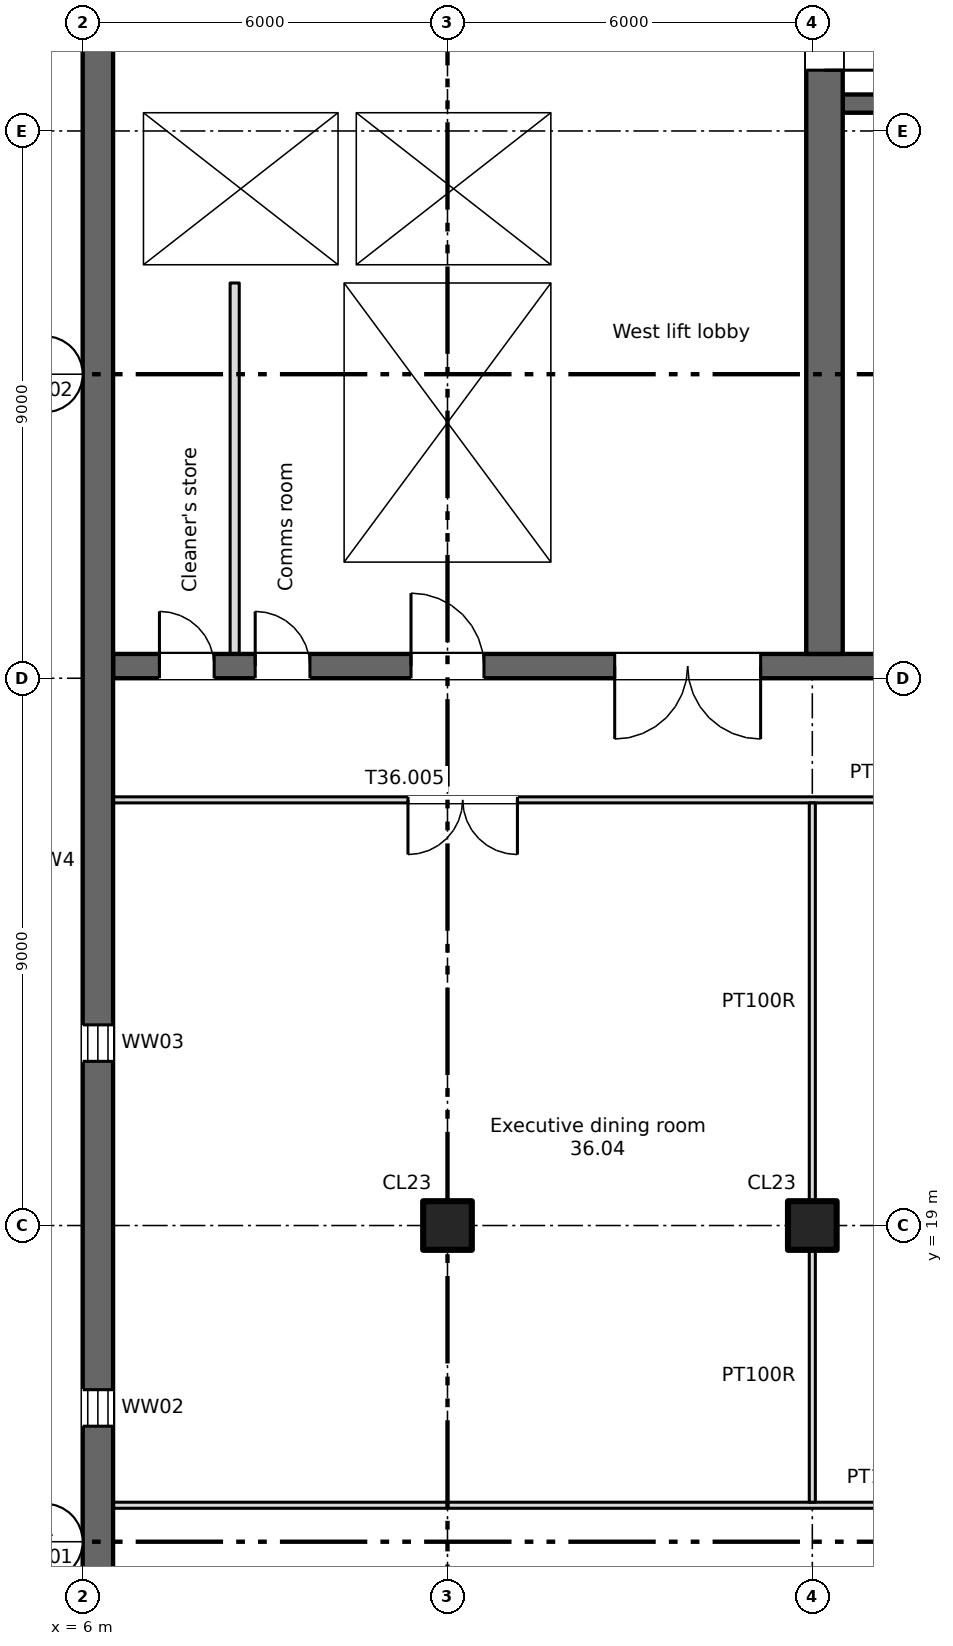
"""IFC4 building model, lengths in metres.
Left out: names, types, materials, properties, quantities, classifications, styles, units other than length and angle.
Written with IfcOpenShell. Run it as: python <this file> out.ifc"""

import sys

from ifc_helpers import new_model, si_unit, direction, frame, frame_2d, origin, origin_2d, place, context, subcontext, project, spatial, rectangle, extrude, element, fill, save


model = new_model("IFC4")
c1 = context("Model", 3, precision=1e-05, world=origin(), true_north=direction((0.0, 1.0)))
c2 = subcontext(c1, "Body", "Model", "MODEL_VIEW")
j1 = project(units=[si_unit("LENGTHUNIT", "METRE"), si_unit("PLANEANGLEUNIT", "RADIAN")], contexts=[c1])
p1 = place(None, origin())
s1 = spatial("IfcSite", under=j1, at=p1, CompositionType="ELEMENT")
p2 = place(p1, origin())
s2 = spatial("IfcBuilding", under=s1, at=p2, CompositionType="ELEMENT")
p3 = place(p2, frame((0.0, 0.0, 254.55)))
s3 = spatial("IfcBuildingStorey", under=s2, at=p3, CompositionType="ELEMENT", Elevation=254.55)
for number, where, z_axis, x_axis in (
    (1, (12.0, 19.0, 0.0), (0.0, 0.0, 1.0), (1.0, 0.0, 0.0)),
    (2, (18.0, 19.0, 0.0), (0.0, 0.0, 1.0), (1.0, 0.0, 0.0)),
):
    element("IfcColumn", number, at=place(p3, frame(where, z_axis=z_axis, x_axis=x_axis)), inside=s3, PredefinedType="COLUMN", context=c2, shape_type="SweptSolid", body=[
        extrude(rectangle(XDim=0.8, YDim=0.8, at=origin_2d()), origin(), (0.0, 0.0, 1.0), 3.4),
    ])
p4 = place(p3, frame((6.25, 8.5, 0.0), z_axis=(0.0, 0.0, 1.0), x_axis=(0.0, 1.0, 0.0)))
e3 = element("IfcWall", 3, at=p4, inside=s3, PredefinedType="SHEAR", context=c2, shape_type="SweptSolid", body=[
    extrude(rectangle(XDim=33.0, YDim=0.5, at=frame_2d((16.5, 0.0))), origin(), (0.0, 0.0, 1.0), 3.4),
])
p5 = place(p4, frame((1.2, 0.0, 0.6)))
e4 = element("IfcOpeningElement", 4, at=p5, cuts=e3, PredefinedType="OPENING", context=c2, shape_type="SweptSolid", body=[
    extrude(rectangle(XDim=0.6, YDim=2.4, at=frame_2d((0.3, 1.2))), frame((0.0, 0.26, 0.0), z_axis=(0.0, -1.0, 0.0), x_axis=(1.0, 0.0, 0.0)), (0.0, 0.0, 1.0), 0.52),
])
p6 = place(p4, frame((7.2, 0.0, 0.6)))
e5 = element("IfcOpeningElement", 5, at=p6, cuts=e3, PredefinedType="OPENING", context=c2, shape_type="SweptSolid", body=[
    extrude(rectangle(XDim=0.6, YDim=2.4, at=frame_2d((0.3, 1.2))), frame((0.0, 0.26, 0.0), z_axis=(0.0, -1.0, 0.0), x_axis=(1.0, 0.0, 0.0)), (0.0, 0.0, 1.0), 0.52),
])
p7 = place(p4, frame((13.2, 0.0, 0.6)))
e6 = element("IfcOpeningElement", 6, at=p7, cuts=e3, PredefinedType="OPENING", context=c2, shape_type="SweptSolid", body=[
    extrude(rectangle(XDim=0.6, YDim=2.4, at=frame_2d((0.3, 1.2))), frame((0.0, 0.26, 0.0), z_axis=(0.0, -1.0, 0.0), x_axis=(1.0, 0.0, 0.0)), (0.0, 0.0, 1.0), 0.52),
])
p8 = place(p3, frame((6.5, 28.2, 0.0), z_axis=(0.0, 0.0, 1.0), x_axis=(1.0, 0.0, 0.0)))
e7 = element("IfcWall", 7, at=p8, inside=s3, PredefinedType="SHEAR", context=c2, shape_type="SweptSolid", body=[
    extrude(rectangle(XDim=58.0, YDim=0.4, at=frame_2d((29.0, 0.0))), origin(), (0.0, 0.0, 1.0), 3.4),
])
p9 = place(p8, frame((12.762, 0.0, 0.0)))
e8 = element("IfcOpeningElement", 8, at=p9, cuts=e7, PredefinedType="OPENING", context=c2, shape_type="SweptSolid", body=[
    extrude(rectangle(XDim=0.9, YDim=2.1, at=frame_2d((0.45, 1.05))), frame((0.0, 0.21, 0.0), z_axis=(0.0, -1.0, 0.0), x_axis=(1.0, 0.0, 0.0)), (0.0, 0.0, 1.0), 0.42),
])
p10 = place(p8, frame((15.337, 0.0, 0.0)))
e9 = element("IfcOpeningElement", 9, at=p10, cuts=e7, PredefinedType="OPENING", context=c2, shape_type="SweptSolid", body=[
    extrude(rectangle(XDim=0.9, YDim=2.1, at=frame_2d((0.45, 1.05))), frame((0.0, 0.21, 0.0), z_axis=(0.0, -1.0, 0.0), x_axis=(1.0, 0.0, 0.0)), (0.0, 0.0, 1.0), 0.42),
])
p11 = place(p8, frame((50.05, 0.0, 0.0)))
e10 = element("IfcOpeningElement", 10, at=p11, cuts=e7, PredefinedType="OPENING", context=c2, shape_type="SweptSolid", body=[
    extrude(rectangle(XDim=0.9, YDim=2.1, at=frame_2d((0.45, 1.05))), frame((0.0, 0.21, 0.0), z_axis=(0.0, -1.0, 0.0), x_axis=(1.0, 0.0, 0.0)), (0.0, 0.0, 1.0), 0.42),
])
p12 = place(p8, frame((0.762, 0.0, 0.0)))
e11 = element("IfcOpeningElement", 11, at=p12, cuts=e7, PredefinedType="OPENING", context=c2, shape_type="SweptSolid", body=[
    extrude(rectangle(XDim=0.9, YDim=2.1, at=frame_2d((0.45, 1.05))), frame((0.0, 0.21, 0.0), z_axis=(0.0, -1.0, 0.0), x_axis=(1.0, 0.0, 0.0)), (0.0, 0.0, 1.0), 0.42),
])
p13 = place(p8, frame((2.337, 0.0, 0.0)))
e12 = element("IfcOpeningElement", 12, at=p13, cuts=e7, PredefinedType="OPENING", context=c2, shape_type="SweptSolid", body=[
    extrude(rectangle(XDim=0.9, YDim=2.1, at=frame_2d((0.45, 1.05))), frame((0.0, 0.21, 0.0), z_axis=(0.0, -1.0, 0.0), x_axis=(1.0, 0.0, 0.0)), (0.0, 0.0, 1.0), 0.42),
])
p14 = place(p8, frame((4.9, 0.0, 0.0)))
e13 = element("IfcOpeningElement", 13, at=p14, cuts=e7, PredefinedType="OPENING", context=c2, shape_type="SweptSolid", body=[
    extrude(rectangle(XDim=1.2, YDim=2.1, at=frame_2d((0.6, 1.05))), frame((0.0, 0.21, 0.0), z_axis=(0.0, -1.0, 0.0), x_axis=(1.0, 0.0, 0.0)), (0.0, 0.0, 1.0), 0.42),
])
p15 = place(p8, frame((31.9, 0.0, 0.0)))
e14 = element("IfcOpeningElement", 14, at=p15, cuts=e7, PredefinedType="OPENING", context=c2, shape_type="SweptSolid", body=[
    extrude(rectangle(XDim=1.2, YDim=2.1, at=frame_2d((0.6, 1.05))), frame((0.0, 0.21, 0.0), z_axis=(0.0, -1.0, 0.0), x_axis=(1.0, 0.0, 0.0)), (0.0, 0.0, 1.0), 0.42),
])
p16 = place(p8, frame((55.4, 0.0, 0.0)))
e15 = element("IfcOpeningElement", 15, at=p16, cuts=e7, PredefinedType="OPENING", context=c2, shape_type="SweptSolid", body=[
    extrude(rectangle(XDim=1.2, YDim=2.1, at=frame_2d((0.6, 1.05))), frame((0.0, 0.21, 0.0), z_axis=(0.0, -1.0, 0.0), x_axis=(1.0, 0.0, 0.0)), (0.0, 0.0, 1.0), 0.42),
])
p17 = place(p8, frame((21.9, 0.0, 0.0)))
e16 = element("IfcOpeningElement", 16, at=p17, cuts=e7, PredefinedType="OPENING", context=c2, shape_type="SweptSolid", body=[
    extrude(rectangle(XDim=1.2, YDim=2.1, at=frame_2d((0.6, 1.05))), frame((0.0, 0.21, 0.0), z_axis=(0.0, -1.0, 0.0), x_axis=(1.0, 0.0, 0.0)), (0.0, 0.0, 1.0), 0.42),
])
p18 = place(p8, frame((41.9, 0.0, 0.0)))
e17 = element("IfcOpeningElement", 17, at=p18, cuts=e7, PredefinedType="OPENING", context=c2, shape_type="SweptSolid", body=[
    extrude(rectangle(XDim=1.2, YDim=2.1, at=frame_2d((0.6, 1.05))), frame((0.0, 0.21, 0.0), z_axis=(0.0, -1.0, 0.0), x_axis=(1.0, 0.0, 0.0)), (0.0, 0.0, 1.0), 0.42),
])
p19 = place(p8, frame((25.05, 0.0, 0.0)))
e18 = element("IfcOpeningElement", 18, at=p19, cuts=e7, PredefinedType="OPENING", context=c2, shape_type="SweptSolid", body=[
    extrude(rectangle(XDim=2.4, YDim=2.1, at=frame_2d((1.2, 1.05))), frame((0.0, 0.21, 0.0), z_axis=(0.0, -1.0, 0.0), x_axis=(1.0, 0.0, 0.0)), (0.0, 0.0, 1.0), 0.42),
])
p20 = place(p8, frame((37.55, 0.0, 0.0)))
e19 = element("IfcOpeningElement", 19, at=p20, cuts=e7, PredefinedType="OPENING", context=c2, shape_type="SweptSolid", body=[
    extrude(rectangle(XDim=2.4, YDim=2.1, at=frame_2d((1.2, 1.05))), frame((0.0, 0.21, 0.0), z_axis=(0.0, -1.0, 0.0), x_axis=(1.0, 0.0, 0.0)), (0.0, 0.0, 1.0), 0.42),
])
p21 = place(p8, frame((8.25, 0.0, 0.0)))
e20 = element("IfcOpeningElement", 20, at=p21, cuts=e7, PredefinedType="OPENING", context=c2, shape_type="SweptSolid", body=[
    extrude(rectangle(XDim=2.4, YDim=2.1, at=frame_2d((1.2, 1.05))), frame((0.0, 0.21, 0.0), z_axis=(0.0, -1.0, 0.0), x_axis=(1.0, 0.0, 0.0)), (0.0, 0.0, 1.0), 0.42),
])
p22 = place(p8, frame((29.05, 0.0, 0.0)))
e21 = element("IfcOpeningElement", 21, at=p22, cuts=e7, PredefinedType="OPENING", context=c2, shape_type="SweptSolid", body=[
    extrude(rectangle(XDim=0.9, YDim=2.1, at=frame_2d((0.45, 1.05))), frame((0.0, 0.21, 0.0), z_axis=(0.0, -1.0, 0.0), x_axis=(1.0, 0.0, 0.0)), (0.0, 0.0, 1.0), 0.42),
])
p23 = place(p8, frame((35.05, 0.0, 0.0)))
e22 = element("IfcOpeningElement", 22, at=p23, cuts=e7, PredefinedType="OPENING", context=c2, shape_type="SweptSolid", body=[
    extrude(rectangle(XDim=0.9, YDim=2.1, at=frame_2d((0.45, 1.05))), frame((0.0, 0.21, 0.0), z_axis=(0.0, -1.0, 0.0), x_axis=(1.0, 0.0, 0.0)), (0.0, 0.0, 1.0), 0.42),
])
p24 = place(p3, frame((6.75, 28.4, 0.0), z_axis=(0.0, 0.0, 1.0), x_axis=(0.0, 1.0, 0.0)))
e23 = element("IfcWall", 23, at=p24, inside=s3, PredefinedType="SHEAR", context=c2, shape_type="SweptSolid", body=[
    extrude(rectangle(XDim=12.85, YDim=0.5, at=frame_2d((6.425, 0.0))), origin(), (0.0, 0.0, 1.0), 3.4),
])
p25 = place(p3, frame((18.2, 28.4, 0.0), z_axis=(0.0, 0.0, 1.0), x_axis=(0.0, 1.0, 0.0)))
e24 = element("IfcWall", 24, at=p25, inside=s3, PredefinedType="SHEAR", context=c2, shape_type="SweptSolid", body=[
    extrude(rectangle(XDim=17.0, YDim=0.6, at=frame_2d((8.5, 0.0))), origin(), (0.0, 0.0, 1.0), 3.4),
])
p26 = place(p25, frame((9.6, 0.0, 0.0)))
e25 = element("IfcOpeningElement", 25, at=p26, cuts=e24, PredefinedType="OPENING", context=c2, shape_type="SweptSolid", body=[
    extrude(rectangle(XDim=2.0, YDim=2.1, at=frame_2d((1.0, 1.05))), frame((0.0, 0.31, 0.0), z_axis=(0.0, -1.0, 0.0), x_axis=(1.0, 0.0, 0.0)), (0.0, 0.0, 1.0), 0.62),
])
p27 = place(p25, frame((15.45, 0.0, 0.0)))
e26 = element("IfcOpeningElement", 26, at=p27, cuts=e24, PredefinedType="OPENING", context=c2, shape_type="SweptSolid", body=[
    extrude(rectangle(XDim=1.2, YDim=2.1, at=frame_2d((0.6, 1.05))), frame((0.0, 0.31, 0.0), z_axis=(0.0, -1.0, 0.0), x_axis=(1.0, 0.0, 0.0)), (0.0, 0.0, 1.0), 0.62),
])
for number, where, z_axis, x_axis in (
    (27, (10.15, 28.4, 0.0), (0.0, 0.0, 1.0), (0.0, 1.0, 0.0)),
    (28, (13.85, 28.4, 0.0), (0.0, 0.0, 1.0), (0.0, 1.0, 0.0)),
):
    element("IfcWall", number, at=place(p3, frame(where, z_axis=z_axis, x_axis=x_axis)), inside=s3, PredefinedType="SHEAR", context=c2, shape_type="SweptSolid", body=[
        extrude(rectangle(XDim=6.1, YDim=0.3, at=frame_2d((3.05, 0.0))), origin(), (0.0, 0.0, 1.0), 3.4),
    ])
p28 = place(p3, frame((7.0, 34.65, 0.0), z_axis=(0.0, 0.0, 1.0), x_axis=(1.0, 0.0, 0.0)))
e29 = element("IfcWall", 29, at=p28, inside=s3, PredefinedType="SHEAR", context=c2, shape_type="SweptSolid", body=[
    extrude(rectangle(XDim=7.0, YDim=0.3, at=frame_2d((3.5, 0.0))), origin(), (0.0, 0.0, 1.0), 3.4),
])
p29 = place(p3, frame((18.5, 34.65, 0.0), z_axis=(0.0, 0.0, 1.0), x_axis=(1.0, 0.0, 0.0)))
e30 = element("IfcWall", 30, at=p29, inside=s3, PredefinedType="SHEAR", context=c2, shape_type="SweptSolid", body=[
    extrude(rectangle(XDim=12.2, YDim=0.3, at=frame_2d((6.1, 0.0))), origin(), (0.0, 0.0, 1.0), 3.4),
])
p30 = place(p29, frame((9.8, 0.0, 0.0)))
e31 = element("IfcOpeningElement", 31, at=p30, cuts=e30, PredefinedType="OPENING", context=c2, shape_type="SweptSolid", body=[
    extrude(rectangle(XDim=1.1, YDim=2.1, at=frame_2d((0.55, 1.05))), frame((0.0, 0.16, 0.0), z_axis=(0.0, -1.0, 0.0), x_axis=(1.0, 0.0, 0.0)), (0.0, 0.0, 1.0), 0.32),
])
p31 = place(p3, frame((7.0, 37.45, 0.0), z_axis=(0.0, 0.0, 1.0), x_axis=(1.0, 0.0, 0.0)))
e32 = element("IfcWall", 32, at=p31, inside=s3, PredefinedType="SHEAR", context=c2, shape_type="SweptSolid", body=[
    extrude(rectangle(XDim=7.0, YDim=0.3, at=frame_2d((3.5, 0.0))), origin(), (0.0, 0.0, 1.0), 3.4),
])
p32 = place(p31, frame((1.05, 0.0, 0.0)))
e33 = element("IfcOpeningElement", 33, at=p32, cuts=e32, PredefinedType="OPENING", context=c2, shape_type="SweptSolid", body=[
    extrude(rectangle(XDim=1.1, YDim=2.1, at=frame_2d((0.55, 1.05))), frame((0.0, 0.16, 0.0), z_axis=(0.0, -1.0, 0.0), x_axis=(1.0, 0.0, 0.0)), (0.0, 0.0, 1.0), 0.32),
])
p33 = place(p31, frame((4.55, 0.0, 0.0)))
e34 = element("IfcOpeningElement", 34, at=p33, cuts=e32, PredefinedType="OPENING", context=c2, shape_type="SweptSolid", body=[
    extrude(rectangle(XDim=1.1, YDim=2.1, at=frame_2d((0.55, 1.05))), frame((0.0, 0.16, 0.0), z_axis=(0.0, -1.0, 0.0), x_axis=(1.0, 0.0, 0.0)), (0.0, 0.0, 1.0), 0.32),
])
p34 = place(p3, frame((30.7, 37.45, 0.0), z_axis=(0.0, 0.0, 1.0), x_axis=(-1.0, 0.0, 0.0)))
e35 = element("IfcWall", 35, at=p34, inside=s3, PredefinedType="SHEAR", context=c2, shape_type="SweptSolid", body=[
    extrude(rectangle(XDim=12.2, YDim=0.3, at=frame_2d((6.1, 0.0))), origin(), (0.0, 0.0, 1.0), 3.4),
])
p35 = place(p34, frame((7.4, 0.0, 0.0)))
e36 = element("IfcOpeningElement", 36, at=p35, cuts=e35, PredefinedType="OPENING", context=c2, shape_type="SweptSolid", body=[
    extrude(rectangle(XDim=0.9, YDim=2.1, at=frame_2d((0.45, 1.05))), frame((0.0, 0.16, 0.0), z_axis=(0.0, -1.0, 0.0), x_axis=(1.0, 0.0, 0.0)), (0.0, 0.0, 1.0), 0.32),
])
for number, where, z_axis, x_axis in (
    (37, (13.85, 34.8, 0.0), (0.0, 0.0, 1.0), (0.0, 1.0, 0.0)),
    (38, (10.35, 34.8, 0.0), (0.0, 0.0, 1.0), (0.0, 1.0, 0.0)),
):
    element("IfcWall", number, at=place(p3, frame(where, z_axis=z_axis, x_axis=x_axis)), inside=s3, PredefinedType="SHEAR", context=c2, shape_type="SweptSolid", body=[
        extrude(rectangle(XDim=2.5, YDim=0.3, at=frame_2d((1.25, 0.0))), origin(), (0.0, 0.0, 1.0), 3.4),
    ])
p36 = place(p3, frame((8.5, 28.4, 0.0), z_axis=(0.0, 0.0, 1.0), x_axis=(0.0, 1.0, 0.0)))
e39 = element("IfcWall", 39, at=p36, inside=s3, PredefinedType="PARTITIONING", context=c2, shape_type="SweptSolid", body=[
    extrude(rectangle(XDim=6.1, YDim=0.15, at=frame_2d((3.05, 0.0))), origin(), (0.0, 0.0, 1.0), 3.4),
])
p37 = place(p3, frame((6.5, 14.4, 0.0), z_axis=(0.0, 0.0, 1.0), x_axis=(1.0, 0.0, 0.0)))
e40 = element("IfcWall", 40, at=p37, inside=s3, PredefinedType="PARTITIONING", context=c2, shape_type="SweptSolid", body=[
    extrude(rectangle(XDim=25.35, YDim=0.1, at=frame_2d((12.675, 0.0))), origin(), (0.0, 0.0, 1.0), 3.4),
])
p38 = place(p3, frame((6.5, 26.0, 0.0), z_axis=(0.0, 0.0, 1.0), x_axis=(1.0, 0.0, 0.0)))
e41 = element("IfcWall", 41, at=p38, inside=s3, PredefinedType="PARTITIONING", context=c2, shape_type="SweptSolid", body=[
    extrude(rectangle(XDim=25.45, YDim=0.1, at=frame_2d((12.725, 0.0))), origin(), (0.0, 0.0, 1.0), 3.4),
])
p39 = place(p38, frame((4.85, 0.0, 0.0)))
e42 = element("IfcOpeningElement", 42, at=p39, cuts=e41, PredefinedType="OPENING", context=c2, shape_type="SweptSolid", body=[
    extrude(rectangle(XDim=1.8, YDim=2.1, at=frame_2d((0.9, 1.05))), frame((0.0, 0.06, 0.0), z_axis=(0.0, -1.0, 0.0), x_axis=(1.0, 0.0, 0.0)), (0.0, 0.0, 1.0), 0.12),
])
p40 = place(p38, frame((14.475, 0.0, 0.0)))
e43 = element("IfcOpeningElement", 43, at=p40, cuts=e41, PredefinedType="OPENING", context=c2, shape_type="SweptSolid", body=[
    extrude(rectangle(XDim=1.0, YDim=2.1, at=frame_2d((0.5, 1.05))), frame((0.0, 0.06, 0.0), z_axis=(0.0, -1.0, 0.0), x_axis=(1.0, 0.0, 0.0)), (0.0, 0.0, 1.0), 0.12),
])
p41 = place(p38, frame((21.425, 0.0, 0.0)))
e44 = element("IfcOpeningElement", 44, at=p41, cuts=e41, PredefinedType="OPENING", context=c2, shape_type="SweptSolid", body=[
    extrude(rectangle(XDim=1.0, YDim=2.1, at=frame_2d((0.5, 1.05))), frame((0.0, 0.06, 0.0), z_axis=(0.0, -1.0, 0.0), x_axis=(1.0, 0.0, 0.0)), (0.0, 0.0, 1.0), 0.12),
])
p42 = place(p3, frame((18.0, 14.45, 0.0), z_axis=(0.0, 0.0, 1.0), x_axis=(0.0, 1.0, 0.0)))
e45 = element("IfcWall", 45, at=p42, inside=s3, PredefinedType="PARTITIONING", context=c2, shape_type="SweptSolid", body=[
    extrude(rectangle(XDim=4.15, YDim=0.1, at=frame_2d((2.075, 0.0))), origin(), (0.0, 0.0, 1.0), 3.4),
])
p43 = place(p3, frame((18.0, 19.4, 0.0), z_axis=(0.0, 0.0, 1.0), x_axis=(0.0, 1.0, 0.0)))
e46 = element("IfcWall", 46, at=p43, inside=s3, PredefinedType="PARTITIONING", context=c2, shape_type="SweptSolid", body=[
    extrude(rectangle(XDim=6.55, YDim=0.1, at=frame_2d((3.275, 0.0))), origin(), (0.0, 0.0, 1.0), 3.4),
])
p44 = place(p6, origin())
e47 = element("IfcWindow", 47, at=p44, inside=s3, PartitioningType="SINGLE_PANEL", PredefinedType="WINDOW", context=c2, shape_type="SweptSolid", body=[
    extrude(rectangle(XDim=0.6, YDim=2.4, at=frame_2d((0.3, 1.2))), frame((0.0, 0.03, 0.0), z_axis=(0.0, -1.0, 0.0), x_axis=(1.0, 0.0, 0.0)), (0.0, 0.0, 1.0), 0.06),
])
fill(e5, e47)
p45 = place(p7, origin())
e48 = element("IfcWindow", 48, at=p45, inside=s3, PartitioningType="SINGLE_PANEL", PredefinedType="WINDOW", context=c2, shape_type="SweptSolid", body=[
    extrude(rectangle(XDim=0.6, YDim=2.4, at=frame_2d((0.3, 1.2))), frame((0.0, 0.03, 0.0), z_axis=(0.0, -1.0, 0.0), x_axis=(1.0, 0.0, 0.0)), (0.0, 0.0, 1.0), 0.06),
])
fill(e6, e48)
p46 = place(p12, origin())
e49 = element("IfcDoor", 49, at=p46, inside=s3, OperationType="SINGLE_SWING_LEFT", PredefinedType="DOOR", context=c2, shape_type="SweptSolid", body=[
    extrude(rectangle(XDim=0.9, YDim=2.1, at=frame_2d((0.45, 1.05))), frame((0.0, 0.025, 0.0), z_axis=(0.0, -1.0, 0.0), x_axis=(1.0, 0.0, 0.0)), (0.0, 0.0, 1.0), 0.05),
])
fill(e11, e49)
p47 = place(p13, origin())
e50 = element("IfcDoor", 50, at=p47, inside=s3, OperationType="SINGLE_SWING_LEFT", PredefinedType="DOOR", context=c2, shape_type="SweptSolid", body=[
    extrude(rectangle(XDim=0.9, YDim=2.1, at=frame_2d((0.45, 1.05))), frame((0.0, 0.025, 0.0), z_axis=(0.0, -1.0, 0.0), x_axis=(1.0, 0.0, 0.0)), (0.0, 0.0, 1.0), 0.05),
])
fill(e12, e50)
p48 = place(p32, origin())
e51 = element("IfcDoor", 51, at=p48, inside=s3, OperationType="SLIDING_TO_LEFT", PredefinedType="DOOR", context=c2, shape_type="SweptSolid", body=[
    extrude(rectangle(XDim=1.1, YDim=2.1, at=frame_2d((0.55, 1.05))), frame((0.0, 0.025, 0.0), z_axis=(0.0, -1.0, 0.0), x_axis=(1.0, 0.0, 0.0)), (0.0, 0.0, 1.0), 0.05),
])
fill(e33, e51)
p49 = place(p33, origin())
e52 = element("IfcDoor", 52, at=p49, inside=s3, OperationType="SLIDING_TO_LEFT", PredefinedType="DOOR", context=c2, shape_type="SweptSolid", body=[
    extrude(rectangle(XDim=1.1, YDim=2.1, at=frame_2d((0.55, 1.05))), frame((0.0, 0.025, 0.0), z_axis=(0.0, -1.0, 0.0), x_axis=(1.0, 0.0, 0.0)), (0.0, 0.0, 1.0), 0.05),
])
fill(e34, e52)
p50 = place(p14, origin())
e53 = element("IfcDoor", 53, at=p50, inside=s3, OperationType="SINGLE_SWING_LEFT", PredefinedType="DOOR", context=c2, shape_type="SweptSolid", body=[
    extrude(rectangle(XDim=1.2, YDim=2.1, at=frame_2d((0.6, 1.05))), frame((0.0, 0.025, 0.0), z_axis=(0.0, -1.0, 0.0), x_axis=(1.0, 0.0, 0.0)), (0.0, 0.0, 1.0), 0.05),
])
fill(e13, e53)
p51 = place(p21, origin())
e54 = element("IfcDoor", 54, at=p51, inside=s3, OperationType="DOUBLE_DOOR_SINGLE_SWING", PredefinedType="DOOR", context=c2, shape_type="SweptSolid", body=[
    extrude(rectangle(XDim=2.4, YDim=2.1, at=frame_2d((1.2, 1.05))), frame((0.0, 0.025, 0.0), z_axis=(0.0, -1.0, 0.0), x_axis=(1.0, 0.0, 0.0)), (0.0, 0.0, 1.0), 0.05),
])
fill(e20, e54)
p52 = place(p26, origin())
e55 = element("IfcDoor", 55, at=p52, inside=s3, OperationType="DOUBLE_DOOR_SINGLE_SWING", PredefinedType="DOOR", context=c2, shape_type="SweptSolid", body=[
    extrude(rectangle(XDim=2.0, YDim=2.1, at=frame_2d((1.0, 1.05))), frame((0.0, 0.025, 0.0), z_axis=(0.0, -1.0, 0.0), x_axis=(1.0, 0.0, 0.0)), (0.0, 0.0, 1.0), 0.05),
])
fill(e25, e55)
p53 = place(p39, origin())
e56 = element("IfcDoor", 56, at=p53, inside=s3, OperationType="DOUBLE_DOOR_SINGLE_SWING", PredefinedType="DOOR", context=c2, shape_type="SweptSolid", body=[
    extrude(rectangle(XDim=1.8, YDim=2.1, at=frame_2d((0.9, 1.05))), frame((0.0, 0.025, 0.0), z_axis=(0.0, -1.0, 0.0), x_axis=(1.0, 0.0, 0.0)), (0.0, 0.0, 1.0), 0.05),
])
fill(e42, e56)
save(model, sys.argv[1])
